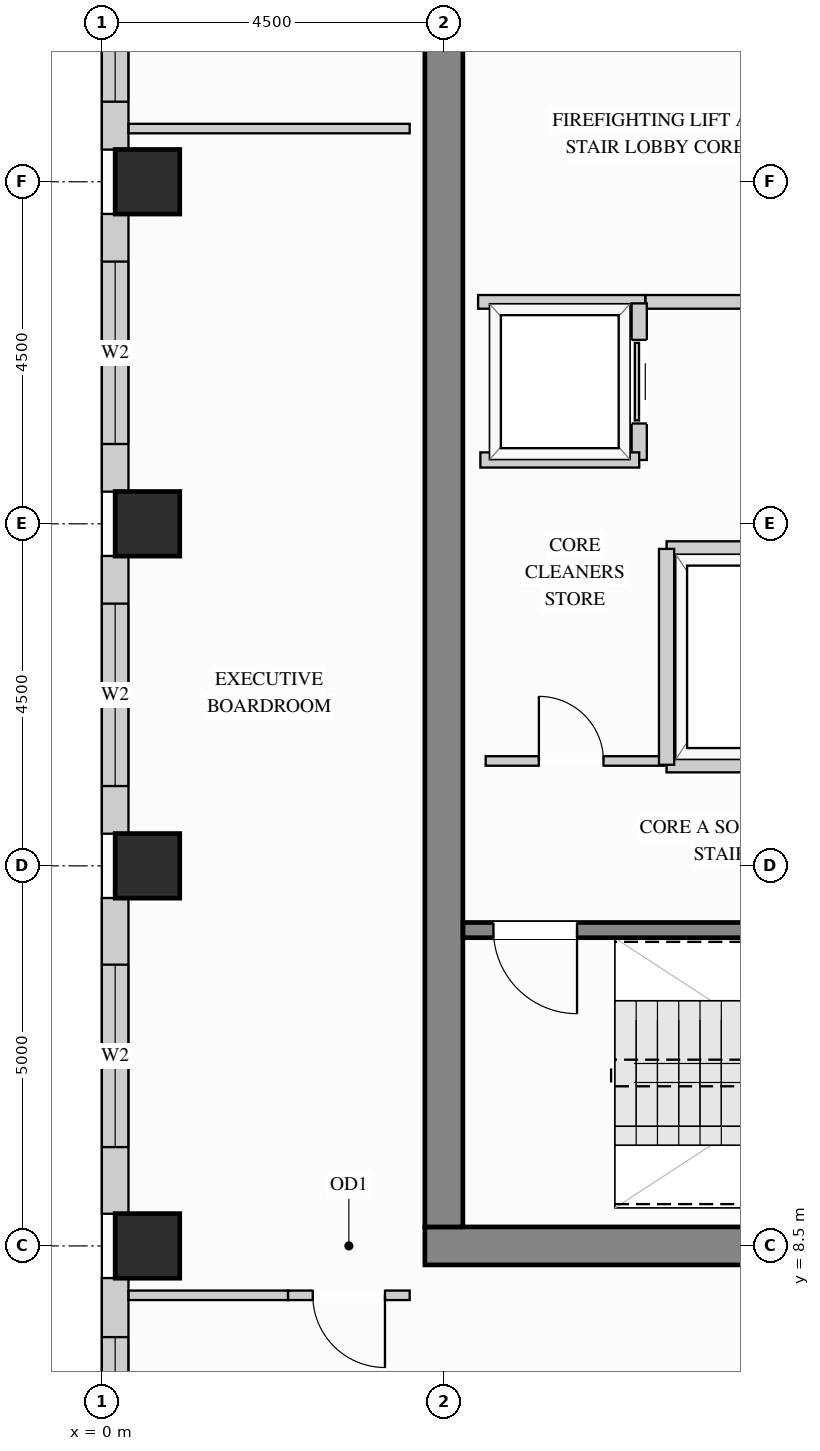
"""IFC4 building model, lengths in metres.
Left out: names, types, materials, properties, quantities, classifications, styles, units other than length and angle.
Written with IfcOpenShell. Run it as: python <this file> out.ifc"""

import sys

from ifc_helpers import new_model, si_unit, direction, frame, frame_2d, origin, origin_2d, place, context, subcontext, project, spatial, rectangle, extrude, source, transform, mapped, element, fill, save


model = new_model("IFC4")
c1 = context("Model", 3, precision=1e-05, world=origin(), true_north=direction((0.0, 1.0)))
c2 = subcontext(c1, "Body", "Model", "MODEL_VIEW")
j1 = project(units=[si_unit("LENGTHUNIT", "METRE"), si_unit("PLANEANGLEUNIT", "RADIAN")], contexts=[c1])
p1 = place(None, origin())
s1 = spatial("IfcSite", under=j1, at=p1, CompositionType="ELEMENT")
p2 = place(p1, origin())
s2 = spatial("IfcBuilding", under=s1, at=p2, CompositionType="ELEMENT")
p3 = place(p2, frame((0.0, 0.0, 223.2)))
s3 = spatial("IfcBuildingStorey", under=s2, at=p3, CompositionType="ELEMENT", Elevation=223.2)
m1 = source(origin(), c2, "Body", "SweptSolid", [
    extrude(rectangle(XDim=0.85, YDim=0.85, at=origin_2d()), origin(), (0.0, 0.0, 1.0), 3.4),
])
for number, where, z_axis, x_axis in (
    (1, (0.6, 13.5, 0.0), (0.0, 0.0, 1.0), (1.0, 0.0, 0.0)),
    (2, (0.6, 18.0, 0.0), (0.0, 0.0, 1.0), (1.0, 0.0, 0.0)),
    (3, (0.6, 22.5, 0.0), (0.0, 0.0, 1.0), (1.0, 0.0, 0.0)),
    (4, (0.6, 8.5, 0.0), (0.0, 0.0, 1.0), (1.0, 0.0, 0.0)),
):
    element("IfcColumn", number, at=place(p3, frame(where, z_axis=z_axis, x_axis=x_axis)), inside=s3, PredefinedType="COLUMN", context=c2, shape_type="MappedRepresentation", body=[
        mapped(m1, transform((0.0, 0.0, 0.0), x_axis=(1.0, 0.0, 0.0), y_axis=(0.0, 1.0, 0.0), z_axis=(0.0, 0.0, 1.0))),
    ])
m2 = source(origin(), c2, "Body", "SweptSolid", [
    extrude(rectangle(XDim=10.5, YDim=0.5, at=frame_2d((5.25, 0.0))), origin(), (0.0, 0.0, 1.0), 3.4),
])
p4 = place(p3, frame((4.25, 8.5, 0.0), z_axis=(0.0, 0.0, 1.0), x_axis=(1.0, 0.0, 0.0)))
e5 = element("IfcWall", 5, at=p4, inside=s3, PredefinedType="SHEAR", context=c2, shape_type="MappedRepresentation", body=[
    mapped(m2, transform((0.0, 0.0, 0.0), x_axis=(1.0, 0.0, 0.0), y_axis=(0.0, 1.0, 0.0), z_axis=(0.0, 0.0, 1.0))),
])
m3 = source(origin(), c2, "Body", "SweptSolid", [
    extrude(rectangle(XDim=20.5, YDim=0.5, at=frame_2d((10.25, 0.0))), origin(), (0.0, 0.0, 1.0), 3.4),
])
p5 = place(p3, frame((4.5, 8.75, 0.0), z_axis=(0.0, 0.0, 1.0), x_axis=(0.0, 1.0, 0.0)))
e6 = element("IfcWall", 6, at=p5, inside=s3, PredefinedType="SHEAR", context=c2, shape_type="MappedRepresentation", body=[
    mapped(m3, transform((0.0, 0.0, 0.0), x_axis=(1.0, 0.0, 0.0), y_axis=(0.0, 1.0, 0.0), z_axis=(0.0, 0.0, 1.0))),
])
p6 = place(p3, frame((0.175, 26.377, 0.0), z_axis=(0.0, 0.0, 1.0), x_axis=(0.0, -1.0, 0.0)))
e7 = element("IfcWall", 7, at=p6, inside=s3, PredefinedType="SOLIDWALL", context=c2, shape_type="SweptSolid", body=[
    extrude(rectangle(XDim=3.454, YDim=0.35, at=frame_2d((1.727, 0.0))), origin(), (0.0, 0.0, 1.0), 3.385),
])
p7 = place(p6, frame((0.424, 0.0, 0.78)))
e8 = element("IfcOpeningElement", 8, at=p7, cuts=e7, PredefinedType="OPENING", context=c2, shape_type="SweptSolid", body=[
    extrude(rectangle(XDim=2.4, YDim=2.1, at=frame_2d((1.2, 1.05))), frame((0.0, 0.185, 0.0), z_axis=(0.0, -1.0, 0.0), x_axis=(1.0, 0.0, 0.0)), (0.0, 0.0, 1.0), 0.37),
])
p8 = place(p3, frame((0.175, 22.077, 0.0), z_axis=(0.0, 0.0, 1.0), x_axis=(0.0, -1.0, 0.0)))
e9 = element("IfcWall", 9, at=p8, inside=s3, PredefinedType="SOLIDWALL", context=c2, shape_type="SweptSolid", body=[
    extrude(rectangle(XDim=3.654, YDim=0.35, at=frame_2d((1.827, 0.0))), origin(), (0.0, 0.0, 1.0), 3.385),
])
p9 = place(p8, frame((0.627, 0.0, 0.78)))
e10 = element("IfcOpeningElement", 10, at=p9, cuts=e9, PredefinedType="OPENING", context=c2, shape_type="SweptSolid", body=[
    extrude(rectangle(XDim=2.4, YDim=2.1, at=frame_2d((1.2, 1.05))), frame((0.0, 0.185, 0.0), z_axis=(0.0, -1.0, 0.0), x_axis=(1.0, 0.0, 0.0)), (0.0, 0.0, 1.0), 0.37),
])
p10 = place(p3, frame((0.175, 17.577, 0.0), z_axis=(0.0, 0.0, 1.0), x_axis=(0.0, -1.0, 0.0)))
e11 = element("IfcWall", 11, at=p10, inside=s3, PredefinedType="SOLIDWALL", context=c2, shape_type="SweptSolid", body=[
    extrude(rectangle(XDim=3.654, YDim=0.35, at=frame_2d((1.827, 0.0))), origin(), (0.0, 0.0, 1.0), 3.385),
])
p11 = place(p10, frame((0.627, 0.0, 0.78)))
e12 = element("IfcOpeningElement", 12, at=p11, cuts=e11, PredefinedType="OPENING", context=c2, shape_type="SweptSolid", body=[
    extrude(rectangle(XDim=2.4, YDim=2.1, at=frame_2d((1.2, 1.05))), frame((0.0, 0.185, 0.0), z_axis=(0.0, -1.0, 0.0), x_axis=(1.0, 0.0, 0.0)), (0.0, 0.0, 1.0), 0.37),
])
p12 = place(p3, frame((0.175, 13.077, 0.0), z_axis=(0.0, 0.0, 1.0), x_axis=(0.0, -1.0, 0.0)))
e13 = element("IfcWall", 13, at=p12, inside=s3, PredefinedType="SOLIDWALL", context=c2, shape_type="SweptSolid", body=[
    extrude(rectangle(XDim=4.154, YDim=0.35, at=frame_2d((2.077, 0.0))), origin(), (0.0, 0.0, 1.0), 3.385),
])
p13 = place(p12, frame((0.877, 0.0, 0.78)))
e14 = element("IfcOpeningElement", 14, at=p13, cuts=e13, PredefinedType="OPENING", context=c2, shape_type="SweptSolid", body=[
    extrude(rectangle(XDim=2.4, YDim=2.1, at=frame_2d((1.2, 1.05))), frame((0.0, 0.185, 0.0), z_axis=(0.0, -1.0, 0.0), x_axis=(1.0, 0.0, 0.0)), (0.0, 0.0, 1.0), 0.37),
])
p14 = place(p3, frame((0.175, 8.077, 0.0), z_axis=(0.0, 0.0, 1.0), x_axis=(0.0, -1.0, 0.0)))
e15 = element("IfcWall", 15, at=p14, inside=s3, PredefinedType="SOLIDWALL", context=c2, shape_type="SweptSolid", body=[
    extrude(rectangle(XDim=4.154, YDim=0.35, at=frame_2d((2.077, 0.0))), origin(), (0.0, 0.0, 1.0), 3.385),
])
p15 = place(p14, frame((0.777, 0.0, 0.78)))
e16 = element("IfcOpeningElement", 16, at=p15, cuts=e15, PredefinedType="OPENING", context=c2, shape_type="SweptSolid", body=[
    extrude(rectangle(XDim=1.8, YDim=2.1, at=frame_2d((0.9, 1.05))), frame((0.0, 0.185, 0.0), z_axis=(0.0, -1.0, 0.0), x_axis=(1.0, 0.0, 0.0)), (0.0, 0.0, 1.0), 0.37),
])
p16 = place(p3, frame((7.15, 20.92, 0.0), z_axis=(0.0, 0.0, 1.0), x_axis=(1.0, 0.0, 0.0)))
e17 = element("IfcWall", 17, at=p16, inside=s3, PredefinedType="PARTITIONING", context=c2, shape_type="SweptSolid", body=[
    extrude(rectangle(XDim=4.68, YDim=0.18, at=frame_2d((2.34, 0.0))), origin(), (0.0, 0.0, 1.0), 3.385),
])
p17 = place(p16, frame((2.2, 0.0, 0.0)))
e18 = element("IfcOpeningElement", 18, at=p17, cuts=e17, PredefinedType="OPENING", context=c2, shape_type="SweptSolid", body=[
    extrude(rectangle(XDim=1.1, YDim=2.15, at=frame_2d((0.55, 1.075))), frame((0.0, 0.1, 0.0), z_axis=(0.0, -1.0, 0.0), x_axis=(1.0, 0.0, 0.0)), (0.0, 0.0, 1.0), 0.2),
])
m4 = source(origin(), c2, "Body", "SweptSolid", [
    extrude(rectangle(XDim=2.2, YDim=0.18, at=frame_2d((1.1, 0.0))), origin(), (0.0, 0.0, 1.0), 3.385),
])
p18 = place(p3, frame((4.95, 20.92, 0.0), z_axis=(0.0, 0.0, 1.0), x_axis=(1.0, 0.0, 0.0)))
e19 = element("IfcWall", 19, at=p18, inside=s3, PredefinedType="PARTITIONING", context=c2, shape_type="MappedRepresentation", body=[
    mapped(m4, transform((0.0, 0.0, 0.0), x_axis=(1.0, 0.0, 0.0), y_axis=(0.0, 1.0, 0.0), z_axis=(0.0, 0.0, 1.0))),
])
p19 = place(p3, frame((5.05, 14.88, 0.0), z_axis=(0.0, 0.0, 1.0), x_axis=(1.0, 0.0, 0.0)))
e20 = element("IfcWall", 20, at=p19, inside=s3, PredefinedType="PARTITIONING", context=c2, shape_type="SweptSolid", body=[
    extrude(rectangle(XDim=2.35, YDim=0.125, at=frame_2d((1.175, 0.0))), origin(), (0.0, 0.0, 1.0), 3.385),
])
p20 = place(p19, frame((0.7, 0.0, 0.0)))
e21 = element("IfcOpeningElement", 21, at=p20, cuts=e20, PredefinedType="OPENING", context=c2, shape_type="SweptSolid", body=[
    extrude(rectangle(XDim=0.85, YDim=2.1, at=frame_2d((0.425, 1.05))), frame((0.0, 0.073, 0.0), z_axis=(0.0, -1.0, 0.0), x_axis=(1.0, 0.0, 0.0)), (0.0, 0.0, 1.0), 0.145),
])
m5 = source(origin(), c2, "Body", "SweptSolid", [
    extrude(rectangle(XDim=2.098, YDim=0.125, at=frame_2d((1.049, 0.0))), origin(), (0.0, 0.0, 1.0), 3.385),
])
p21 = place(p3, frame((0.352, 7.85, 0.0), z_axis=(0.0, 0.0, 1.0), x_axis=(1.0, 0.0, 0.0)))
e22 = element("IfcWall", 22, at=p21, inside=s3, PredefinedType="PARTITIONING", context=c2, shape_type="MappedRepresentation", body=[
    mapped(m5, transform((0.0, 0.0, 0.0), x_axis=(1.0, 0.0, 0.0), y_axis=(0.0, 1.0, 0.0), z_axis=(0.0, 0.0, 1.0))),
])
p22 = place(p3, frame((2.45, 7.85, 0.0), z_axis=(0.0, 0.0, 1.0), x_axis=(1.0, 0.0, 0.0)))
e23 = element("IfcWall", 23, at=p22, inside=s3, PredefinedType="PARTITIONING", context=c2, shape_type="SweptSolid", body=[
    extrude(rectangle(XDim=1.6, YDim=0.125, at=frame_2d((0.8, 0.0))), origin(), (0.0, 0.0, 1.0), 3.385),
])
p23 = place(p22, frame((0.325, 0.0, 0.0)))
e24 = element("IfcOpeningElement", 24, at=p23, cuts=e23, PredefinedType="OPENING", context=c2, shape_type="SweptSolid", body=[
    extrude(rectangle(XDim=0.95, YDim=2.15, at=frame_2d((0.475, 1.075))), frame((0.0, 0.073, 0.0), z_axis=(0.0, -1.0, 0.0), x_axis=(1.0, 0.0, 0.0)), (0.0, 0.0, 1.0), 0.145),
])
m6 = source(origin(), c2, "Body", "SweptSolid", [
    extrude(rectangle(XDim=3.698, YDim=0.125, at=frame_2d((1.849, 0.0))), origin(), (0.0, 0.0, 1.0), 3.385),
])
p24 = place(p3, frame((0.352, 23.2, 0.0), z_axis=(0.0, 0.0, 1.0), x_axis=(1.0, 0.0, 0.0)))
e25 = element("IfcWall", 25, at=p24, inside=s3, PredefinedType="PARTITIONING", context=c2, shape_type="MappedRepresentation", body=[
    mapped(m6, transform((0.0, 0.0, 0.0), x_axis=(1.0, 0.0, 0.0), y_axis=(0.0, 1.0, 0.0), z_axis=(0.0, 0.0, 1.0))),
])
p25 = place(p3, frame((7.07, 18.84, 0.0), z_axis=(0.0, 0.0, 1.0), x_axis=(0.0, 1.0, 0.0)))
e26 = element("IfcWall", 26, at=p25, inside=s3, PredefinedType="PARTITIONING", context=c2, shape_type="SweptSolid", body=[
    extrude(rectangle(XDim=2.06, YDim=0.2, at=frame_2d((1.03, 0.0))), origin(), (0.0, 0.0, 1.0), 3.385),
])
p26 = place(p25, frame((0.48, 0.0, 0.0)))
e27 = element("IfcOpeningElement", 27, at=p26, cuts=e26, PredefinedType="OPENING", context=c2, shape_type="SweptSolid", body=[
    extrude(rectangle(XDim=1.1, YDim=2.2, at=frame_2d((0.55, 1.1))), frame((0.0, 0.11, 0.0), z_axis=(0.0, -1.0, 0.0), x_axis=(1.0, 0.0, 0.0)), (0.0, 0.0, 1.0), 0.22),
])
m7 = source(origin(), c2, "Body", "SweptSolid", [
    extrude(rectangle(XDim=2.09, YDim=0.2, at=frame_2d((1.045, 0.0))), origin(), (0.0, 0.0, 1.0), 3.385),
])
p27 = place(p3, frame((4.98, 18.84, 0.0), z_axis=(0.0, 0.0, 1.0), x_axis=(1.0, 0.0, 0.0)))
e28 = element("IfcWall", 28, at=p27, inside=s3, PredefinedType="PARTITIONING", context=c2, shape_type="MappedRepresentation", body=[
    mapped(m7, transform((0.0, 0.0, 0.0), x_axis=(1.0, 0.0, 0.0), y_axis=(0.0, 1.0, 0.0), z_axis=(0.0, 0.0, 1.0))),
])
m8 = source(origin(), c2, "Body", "SweptSolid", [
    extrude(rectangle(XDim=2.04, YDim=0.2, at=frame_2d((1.02, 0.0))), origin(), (0.0, 0.0, 1.0), 3.385),
])
for number, where, z_axis, x_axis in (
    (29, (7.43, 17.67, 0.0), (0.0, 0.0, 1.0), (1.0, 0.0, 0.0)),
    (30, (7.43, 14.83, 0.0), (0.0, 0.0, 1.0), (1.0, 0.0, 0.0)),
):
    element("IfcWall", number, at=place(p3, frame(where, z_axis=z_axis, x_axis=x_axis)), inside=s3, PredefinedType="PARTITIONING", context=c2, shape_type="MappedRepresentation", body=[
        mapped(m8, transform((0.0, 0.0, 0.0), x_axis=(1.0, 0.0, 0.0), y_axis=(0.0, 1.0, 0.0), z_axis=(0.0, 0.0, 1.0))),
    ])
m9 = source(origin(), c2, "Body", "SweptSolid", [
    extrude(rectangle(XDim=2.84, YDim=0.2, at=frame_2d((1.42, 0.0))), origin(), (0.0, 0.0, 1.0), 3.385),
])
p28 = place(p3, frame((7.43, 14.83, 0.0), z_axis=(0.0, 0.0, 1.0), x_axis=(0.0, 1.0, 0.0)))
e31 = element("IfcWall", 31, at=p28, inside=s3, PredefinedType="PARTITIONING", context=c2, shape_type="MappedRepresentation", body=[
    mapped(m9, transform((0.0, 0.0, 0.0), x_axis=(1.0, 0.0, 0.0), y_axis=(0.0, 1.0, 0.0), z_axis=(0.0, 0.0, 1.0))),
])
p29 = place(p3, frame((4.752, 12.655, 0.0), z_axis=(0.0, 0.0, 1.0), x_axis=(1.0, 0.0, 0.0)))
e32 = element("IfcWall", 32, at=p29, inside=s3, PredefinedType="SHEAR", context=c2, shape_type="SweptSolid", body=[
    extrude(rectangle(XDim=7.653, YDim=0.2, at=frame_2d((3.827, 0.0))), origin(), (0.0, 0.0, 1.0), 3.4),
])
p30 = place(p29, frame((0.4, 0.0, 0.0)))
e33 = element("IfcOpeningElement", 33, at=p30, cuts=e32, PredefinedType="OPENING", context=c2, shape_type="SweptSolid", body=[
    extrude(rectangle(XDim=1.1, YDim=2.15, at=frame_2d((0.55, 1.075))), frame((0.0, 0.11, 0.0), z_axis=(0.0, -1.0, 0.0), x_axis=(1.0, 0.0, 0.0)), (0.0, 0.0, 1.0), 0.22),
])
m10 = source(origin(), c2, "Body", "SweptSolid", [
    extrude(rectangle(XDim=1.1, YDim=2.2, at=frame_2d((0.55, 1.1))), frame((0.0, 0.025, 0.0), z_axis=(0.0, -1.0, 0.0), x_axis=(1.0, 0.0, 0.0)), (0.0, 0.0, 1.0), 0.05),
])
p31 = place(p26, origin())
e34 = element("IfcDoor", 34, at=p31, inside=s3, OperationType="SLIDING_TO_LEFT", PredefinedType="DOOR", context=c2, shape_type="MappedRepresentation", body=[
    mapped(m10, transform((0.0, 0.0, 0.0), x_axis=(1.0, 0.0, 0.0), y_axis=(0.0, 1.0, 0.0), z_axis=(0.0, 0.0, 1.0))),
])
fill(e27, e34)
m11 = source(origin(), c2, "Body", "SweptSolid", [
    extrude(rectangle(XDim=0.95, YDim=2.15, at=frame_2d((0.475, 1.075))), frame((0.0, 0.025, 0.0), z_axis=(0.0, -1.0, 0.0), x_axis=(1.0, 0.0, 0.0)), (0.0, 0.0, 1.0), 0.05),
])
p32 = place(p23, origin())
e35 = element("IfcDoor", 35, at=p32, inside=s3, OperationType="SINGLE_SWING_RIGHT", PredefinedType="DOOR", context=c2, shape_type="MappedRepresentation", body=[
    mapped(m11, transform((0.0, 0.0, 0.0), x_axis=(1.0, 0.0, 0.0), y_axis=(0.0, 1.0, 0.0), z_axis=(0.0, 0.0, 1.0))),
])
fill(e24, e35)
m12 = source(origin(), c2, "Body", "SweptSolid", [
    extrude(rectangle(XDim=0.85, YDim=2.1, at=frame_2d((0.425, 1.05))), frame((0.0, 0.025, 0.0), z_axis=(0.0, -1.0, 0.0), x_axis=(1.0, 0.0, 0.0)), (0.0, 0.0, 1.0), 0.05),
])
p33 = place(p20, origin())
e36 = element("IfcDoor", 36, at=p33, inside=s3, OperationType="SINGLE_SWING_LEFT", PredefinedType="DOOR", context=c2, shape_type="MappedRepresentation", body=[
    mapped(m12, transform((0.0, 0.0, 0.0), x_axis=(1.0, 0.0, 0.0), y_axis=(0.0, 1.0, 0.0), z_axis=(0.0, 0.0, 1.0))),
])
fill(e21, e36)
m13 = source(origin(), c2, "Body", "SweptSolid", [
    extrude(rectangle(XDim=1.1, YDim=2.15, at=frame_2d((0.55, 1.075))), frame((0.0, 0.025, 0.0), z_axis=(0.0, -1.0, 0.0), x_axis=(1.0, 0.0, 0.0)), (0.0, 0.0, 1.0), 0.05),
])
p34 = place(p30, origin())
e37 = element("IfcDoor", 37, at=p34, inside=s3, OperationType="SINGLE_SWING_RIGHT", PredefinedType="DOOR", context=c2, shape_type="MappedRepresentation", body=[
    mapped(m13, transform((0.0, 0.0, 0.0), x_axis=(1.0, 0.0, 0.0), y_axis=(0.0, 1.0, 0.0), z_axis=(0.0, 0.0, 1.0))),
])
fill(e33, e37)
m14 = source(origin(), c2, "Body", "SweptSolid", [
    extrude(rectangle(XDim=1.8, YDim=2.1, at=frame_2d((0.9, 1.05))), frame((0.0, 0.03, 0.0), z_axis=(0.0, -1.0, 0.0), x_axis=(1.0, 0.0, 0.0)), (0.0, 0.0, 1.0), 0.06),
])
p35 = place(p15, origin())
e38 = element("IfcWindow", 38, at=p35, inside=s3, PartitioningType="SINGLE_PANEL", PredefinedType="WINDOW", context=c2, shape_type="MappedRepresentation", body=[
    mapped(m14, transform((0.0, 0.0, 0.0), x_axis=(1.0, 0.0, 0.0), y_axis=(0.0, 1.0, 0.0), z_axis=(0.0, 0.0, 1.0))),
])
fill(e16, e38)
m15 = source(origin(), c2, "Body", "SweptSolid", [
    extrude(rectangle(XDim=2.4, YDim=2.1, at=frame_2d((1.2, 1.05))), frame((0.0, 0.03, 0.0), z_axis=(0.0, -1.0, 0.0), x_axis=(1.0, 0.0, 0.0)), (0.0, 0.0, 1.0), 0.06),
])
p36 = place(p7, origin())
e39 = element("IfcWindow", 39, at=p36, inside=s3, PartitioningType="SINGLE_PANEL", PredefinedType="WINDOW", context=c2, shape_type="MappedRepresentation", body=[
    mapped(m15, transform((0.0, 0.0, 0.0), x_axis=(1.0, 0.0, 0.0), y_axis=(0.0, 1.0, 0.0), z_axis=(0.0, 0.0, 1.0))),
])
fill(e8, e39)
p37 = place(p9, origin())
e40 = element("IfcWindow", 40, at=p37, inside=s3, PartitioningType="SINGLE_PANEL", PredefinedType="WINDOW", context=c2, shape_type="MappedRepresentation", body=[
    mapped(m15, transform((0.0, 0.0, 0.0), x_axis=(1.0, 0.0, 0.0), y_axis=(0.0, 1.0, 0.0), z_axis=(0.0, 0.0, 1.0))),
])
fill(e10, e40)
p38 = place(p11, origin())
e41 = element("IfcWindow", 41, at=p38, inside=s3, PartitioningType="SINGLE_PANEL", PredefinedType="WINDOW", context=c2, shape_type="MappedRepresentation", body=[
    mapped(m15, transform((0.0, 0.0, 0.0), x_axis=(1.0, 0.0, 0.0), y_axis=(0.0, 1.0, 0.0), z_axis=(0.0, 0.0, 1.0))),
])
fill(e12, e41)
p39 = place(p13, origin())
e42 = element("IfcWindow", 42, at=p39, inside=s3, PartitioningType="SINGLE_PANEL", PredefinedType="WINDOW", context=c2, shape_type="MappedRepresentation", body=[
    mapped(m15, transform((0.0, 0.0, 0.0), x_axis=(1.0, 0.0, 0.0), y_axis=(0.0, 1.0, 0.0), z_axis=(0.0, 0.0, 1.0))),
])
fill(e14, e42)
save(model, sys.argv[1])
